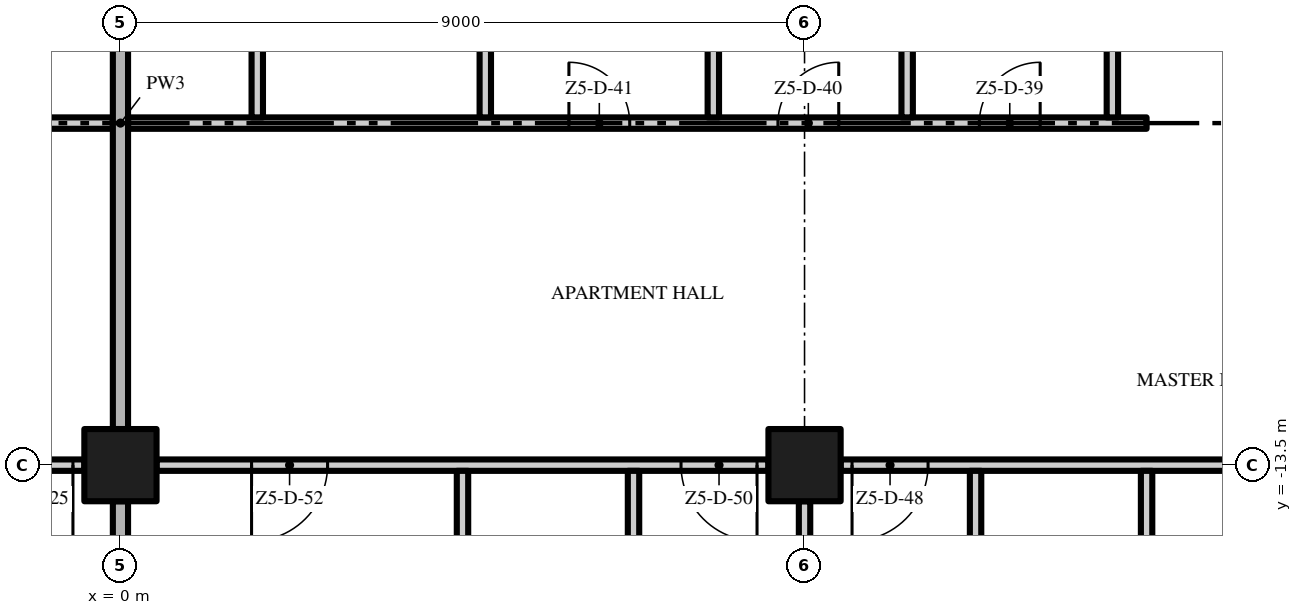
"""IFC4 building model, lengths in metres.
Left out: names, types, materials, properties, quantities, classifications, styles, units other than length and angle.
Written with IfcOpenShell. Run it as: python <this file> out.ifc"""

import sys

from ifc_helpers import new_model, si_unit, direction, frame, frame_2d, origin, origin_2d, place, context, subcontext, project, spatial, rectangle, extrude, element, fill, save


model = new_model("IFC4")
c1 = context("Model", 3, precision=1e-05, world=origin(), true_north=direction((0.0, 1.0)))
c2 = subcontext(c1, "Body", "Model", "MODEL_VIEW")
j1 = project(units=[si_unit("LENGTHUNIT", "METRE"), si_unit("PLANEANGLEUNIT", "RADIAN")], contexts=[c1])
p1 = place(None, origin())
s1 = spatial("IfcSite", under=j1, at=p1, CompositionType="ELEMENT")
p2 = place(p1, origin())
s2 = spatial("IfcBuilding", under=s1, at=p2, CompositionType="ELEMENT")
p3 = place(p2, frame((0.0, 0.0, 273.0)))
s3 = spatial("IfcBuildingStorey", under=s2, at=p3, CompositionType="ELEMENT", Elevation=273.0)
for number, where, z_axis, x_axis in (
    (1, (0.0, -13.5, 0.0), (0.0, 0.0, 1.0), (1.0, 0.0, 0.0)),
    (2, (9.0, -13.5, 0.0), (0.0, 0.0, 1.0), (1.0, 0.0, 0.0)),
):
    element("IfcColumn", number, at=place(p3, frame(where, z_axis=z_axis, x_axis=x_axis)), inside=s3, PredefinedType="COLUMN", context=c2, shape_type="SweptSolid", body=[
        extrude(rectangle(XDim=0.95, YDim=0.95, at=origin_2d()), origin(), (0.0, 0.0, 1.0), 3.5),
    ])
p4 = place(p3, frame((-0.475, -13.5, 0.0), z_axis=(0.0, 0.0, 1.0), x_axis=(-1.0, 0.0, 0.0)))
e3 = element("IfcWall", 3, at=p4, inside=s3, PredefinedType="PARTITIONING", context=c2, shape_type="SweptSolid", body=[
    extrude(rectangle(XDim=8.05, YDim=0.15, at=frame_2d((4.025, 0.0))), origin(), (0.0, 0.0, 1.0), 3.5),
])
p5 = place(p4, frame((0.15, 0.0, 0.0)))
e4 = element("IfcOpeningElement", 4, at=p5, cuts=e3, PredefinedType="OPENING", context=c2, shape_type="SweptSolid", body=[
    extrude(rectangle(XDim=1.0, YDim=2.4, at=frame_2d((0.5, 1.2))), frame((0.0, 0.085, 0.0), z_axis=(0.0, -1.0, 0.0), x_axis=(1.0, 0.0, 0.0)), (0.0, 0.0, 1.0), 0.17),
])
p6 = place(p4, frame((6.9, 0.0, 0.0)))
e5 = element("IfcOpeningElement", 5, at=p6, cuts=e3, PredefinedType="OPENING", context=c2, shape_type="SweptSolid", body=[
    extrude(rectangle(XDim=1.0, YDim=2.4, at=frame_2d((0.5, 1.2))), frame((0.0, 0.085, 0.0), z_axis=(0.0, -1.0, 0.0), x_axis=(1.0, 0.0, 0.0)), (0.0, 0.0, 1.0), 0.17),
])
p7 = place(p3, frame((8.525, -13.5, 0.0), z_axis=(0.0, 0.0, 1.0), x_axis=(-1.0, 0.0, 0.0)))
e6 = element("IfcWall", 6, at=p7, inside=s3, PredefinedType="PARTITIONING", context=c2, shape_type="SweptSolid", body=[
    extrude(rectangle(XDim=8.05, YDim=0.15, at=frame_2d((4.025, 0.0))), origin(), (0.0, 0.0, 1.0), 3.5),
])
p8 = place(p7, frame((0.15, 0.0, 0.0)))
e7 = element("IfcOpeningElement", 7, at=p8, cuts=e6, PredefinedType="OPENING", context=c2, shape_type="SweptSolid", body=[
    extrude(rectangle(XDim=1.0, YDim=2.4, at=frame_2d((0.5, 1.2))), frame((0.0, 0.085, 0.0), z_axis=(0.0, -1.0, 0.0), x_axis=(1.0, 0.0, 0.0)), (0.0, 0.0, 1.0), 0.17),
])
p9 = place(p7, frame((5.8, 0.0, 0.0)))
e8 = element("IfcOpeningElement", 8, at=p9, cuts=e6, PredefinedType="OPENING", context=c2, shape_type="SweptSolid", body=[
    extrude(rectangle(XDim=1.0, YDim=2.4, at=frame_2d((0.5, 1.2))), frame((0.0, 0.085, 0.0), z_axis=(0.0, -1.0, 0.0), x_axis=(1.0, 0.0, 0.0)), (0.0, 0.0, 1.0), 0.17),
])
p10 = place(p3, frame((17.525, -13.5, 0.0), z_axis=(0.0, 0.0, 1.0), x_axis=(-1.0, 0.0, 0.0)))
e9 = element("IfcWall", 9, at=p10, inside=s3, PredefinedType="PARTITIONING", context=c2, shape_type="SweptSolid", body=[
    extrude(rectangle(XDim=8.05, YDim=0.15, at=frame_2d((4.025, 0.0))), origin(), (0.0, 0.0, 1.0), 3.5),
])
p11 = place(p10, frame((0.15, 0.0, 0.0)))
e10 = element("IfcOpeningElement", 10, at=p11, cuts=e9, PredefinedType="OPENING", context=c2, shape_type="SweptSolid", body=[
    extrude(rectangle(XDim=1.0, YDim=2.4, at=frame_2d((0.5, 1.2))), frame((0.0, 0.085, 0.0), z_axis=(0.0, -1.0, 0.0), x_axis=(1.0, 0.0, 0.0)), (0.0, 0.0, 1.0), 0.17),
])
p12 = place(p10, frame((6.9, 0.0, 0.0)))
e11 = element("IfcOpeningElement", 11, at=p12, cuts=e9, PredefinedType="OPENING", context=c2, shape_type="SweptSolid", body=[
    extrude(rectangle(XDim=1.0, YDim=2.4, at=frame_2d((0.5, 1.2))), frame((0.0, 0.085, 0.0), z_axis=(0.0, -1.0, 0.0), x_axis=(1.0, 0.0, 0.0)), (0.0, 0.0, 1.0), 0.17),
])
p13 = place(p3, frame((-13.425, -9.0, 0.0), z_axis=(0.0, 0.0, 1.0), x_axis=(1.0, 0.0, 0.0)))
e12 = element("IfcWall", 12, at=p13, inside=s3, PredefinedType="PARTITIONING", context=c2, shape_type="SweptSolid", body=[
    extrude(rectangle(XDim=13.325, YDim=0.15, at=frame_2d((6.662, 0.0))), origin(), (0.0, 0.0, 1.0), 3.5),
])
p14 = place(p13, frame((4.675, 0.0, 0.0)))
e13 = element("IfcOpeningElement", 13, at=p14, cuts=e12, PredefinedType="OPENING", context=c2, shape_type="SweptSolid", body=[
    extrude(rectangle(XDim=1.0, YDim=2.4, at=frame_2d((0.5, 1.2))), frame((0.0, 0.085, 0.0), z_axis=(0.0, -1.0, 0.0), x_axis=(1.0, 0.0, 0.0)), (0.0, 0.0, 1.0), 0.17),
])
p15 = place(p3, frame((0.1, -9.0, 0.0), z_axis=(0.0, 0.0, 1.0), x_axis=(1.0, 0.0, 0.0)))
e14 = element("IfcWall", 14, at=p15, inside=s3, PredefinedType="PARTITIONING", context=c2, shape_type="SweptSolid", body=[
    extrude(rectangle(XDim=13.4, YDim=0.15, at=frame_2d((6.7, 0.0))), origin(), (0.0, 0.0, 1.0), 3.5),
])
p16 = place(p15, frame((11.2, 0.0, 0.0)))
e15 = element("IfcOpeningElement", 15, at=p16, cuts=e14, PredefinedType="OPENING", context=c2, shape_type="SweptSolid", body=[
    extrude(rectangle(XDim=0.8, YDim=2.0, at=frame_2d((0.4, 1.0))), frame((0.0, 0.085, 0.0), z_axis=(0.0, -1.0, 0.0), x_axis=(1.0, 0.0, 0.0)), (0.0, 0.0, 1.0), 0.17),
])
p17 = place(p15, frame((8.55, 0.0, 0.0)))
e16 = element("IfcOpeningElement", 16, at=p17, cuts=e14, PredefinedType="OPENING", context=c2, shape_type="SweptSolid", body=[
    extrude(rectangle(XDim=0.8, YDim=2.0, at=frame_2d((0.4, 1.0))), frame((0.0, 0.085, 0.0), z_axis=(0.0, -1.0, 0.0), x_axis=(1.0, 0.0, 0.0)), (0.0, 0.0, 1.0), 0.17),
])
p18 = place(p15, frame((5.8, 0.0, 0.0)))
e17 = element("IfcOpeningElement", 17, at=p18, cuts=e14, PredefinedType="OPENING", context=c2, shape_type="SweptSolid", body=[
    extrude(rectangle(XDim=0.8, YDim=2.0, at=frame_2d((0.4, 1.0))), frame((0.0, 0.085, 0.0), z_axis=(0.0, -1.0, 0.0), x_axis=(1.0, 0.0, 0.0)), (0.0, 0.0, 1.0), 0.17),
])
p19 = place(p3, frame((0.0, -21.6, 0.0), z_axis=(0.0, 0.0, 1.0), x_axis=(0.0, 1.0, 0.0)))
e18 = element("IfcWall", 18, at=p19, inside=s3, PredefinedType="PARTITIONING", context=c2, shape_type="SweptSolid", body=[
    extrude(rectangle(XDim=7.625, YDim=0.2, at=frame_2d((3.812, 0.0))), origin(), (0.0, 0.0, 1.0), 3.5),
])
p20 = place(p3, frame((0.0, -13.025, 0.0), z_axis=(0.0, 0.0, 1.0), x_axis=(0.0, 1.0, 0.0)))
e19 = element("IfcWall", 19, at=p20, inside=s3, PredefinedType="PARTITIONING", context=c2, shape_type="SweptSolid", body=[
    extrude(rectangle(XDim=8.05, YDim=0.2, at=frame_2d((4.025, 0.0))), origin(), (0.0, 0.0, 1.0), 3.5),
])
p21 = place(p3, frame((1.8, -8.925, 0.0), z_axis=(0.0, 0.0, 1.0), x_axis=(0.0, 1.0, 0.0)))
e20 = element("IfcWall", 20, at=p21, inside=s3, PredefinedType="PARTITIONING", context=c2, shape_type="SweptSolid", body=[
    extrude(rectangle(XDim=4.35, YDim=0.15, at=frame_2d((2.175, 0.0))), origin(), (0.0, 0.0, 1.0), 3.5),
])
p22 = place(p3, frame((4.5, -22.2, 0.0), z_axis=(0.0, 0.0, 1.0), x_axis=(0.0, 1.0, 0.0)))
e21 = element("IfcWall", 21, at=p22, inside=s3, PredefinedType="PARTITIONING", context=c2, shape_type="SweptSolid", body=[
    extrude(rectangle(XDim=8.625, YDim=0.15, at=frame_2d((4.312, 0.0))), origin(), (0.0, 0.0, 1.0), 3.5),
])
p23 = place(p3, frame((4.8, -8.925, 0.0), z_axis=(0.0, 0.0, 1.0), x_axis=(0.0, 1.0, 0.0)))
e22 = element("IfcWall", 22, at=p23, inside=s3, PredefinedType="PARTITIONING", context=c2, shape_type="SweptSolid", body=[
    extrude(rectangle(XDim=4.35, YDim=0.15, at=frame_2d((2.175, 0.0))), origin(), (0.0, 0.0, 1.0), 3.5),
])
p24 = place(p3, frame((6.75, -16.575, 0.0), z_axis=(0.0, 0.0, 1.0), x_axis=(0.0, 1.0, 0.0)))
e23 = element("IfcWall", 23, at=p24, inside=s3, PredefinedType="PARTITIONING", context=c2, shape_type="SweptSolid", body=[
    extrude(rectangle(XDim=3.0, YDim=0.15, at=frame_2d((1.5, 0.0))), origin(), (0.0, 0.0, 1.0), 3.5),
])
p25 = place(p3, frame((7.8, -8.925, 0.0), z_axis=(0.0, 0.0, 1.0), x_axis=(0.0, 1.0, 0.0)))
e24 = element("IfcWall", 24, at=p25, inside=s3, PredefinedType="PARTITIONING", context=c2, shape_type="SweptSolid", body=[
    extrude(rectangle(XDim=4.35, YDim=0.15, at=frame_2d((2.175, 0.0))), origin(), (0.0, 0.0, 1.0), 3.5),
])
p26 = place(p3, frame((9.0, -21.6, 0.0), z_axis=(0.0, 0.0, 1.0), x_axis=(0.0, 1.0, 0.0)))
e25 = element("IfcWall", 25, at=p26, inside=s3, PredefinedType="PARTITIONING", context=c2, shape_type="SweptSolid", body=[
    extrude(rectangle(XDim=7.625, YDim=0.15, at=frame_2d((3.812, 0.0))), origin(), (0.0, 0.0, 1.0), 3.5),
])
p27 = place(p3, frame((10.35, -8.925, 0.0), z_axis=(0.0, 0.0, 1.0), x_axis=(0.0, 1.0, 0.0)))
e26 = element("IfcWall", 26, at=p27, inside=s3, PredefinedType="PARTITIONING", context=c2, shape_type="SweptSolid", body=[
    extrude(rectangle(XDim=4.35, YDim=0.15, at=frame_2d((2.175, 0.0))), origin(), (0.0, 0.0, 1.0), 3.5),
])
p28 = place(p3, frame((11.25, -16.575, 0.0), z_axis=(0.0, 0.0, 1.0), x_axis=(0.0, 1.0, 0.0)))
e27 = element("IfcWall", 27, at=p28, inside=s3, PredefinedType="PARTITIONING", context=c2, shape_type="SweptSolid", body=[
    extrude(rectangle(XDim=3.0, YDim=0.15, at=frame_2d((1.5, 0.0))), origin(), (0.0, 0.0, 1.0), 3.5),
])
p29 = place(p3, frame((13.05, -8.925, 0.0), z_axis=(0.0, 0.0, 1.0), x_axis=(0.0, 1.0, 0.0)))
e28 = element("IfcWall", 28, at=p29, inside=s3, PredefinedType="PARTITIONING", context=c2, shape_type="SweptSolid", body=[
    extrude(rectangle(XDim=4.5, YDim=0.15, at=frame_2d((2.25, 0.0))), origin(), (0.0, 0.0, 1.0), 3.5),
])
p30 = place(p3, frame((13.5, -22.2, 0.0), z_axis=(0.0, 0.0, 1.0), x_axis=(0.0, 1.0, 0.0)))
e29 = element("IfcWall", 29, at=p30, inside=s3, PredefinedType="PARTITIONING", context=c2, shape_type="SweptSolid", body=[
    extrude(rectangle(XDim=8.625, YDim=0.15, at=frame_2d((4.312, 0.0))), origin(), (0.0, 0.0, 1.0), 3.5),
])
p31 = place(p5, origin())
e30 = element("IfcDoor", 30, at=p31, inside=s3, OperationType="SINGLE_SWING_LEFT", PredefinedType="DOOR", context=c2, shape_type="SweptSolid", body=[
    extrude(rectangle(XDim=1.0, YDim=2.4, at=frame_2d((0.5, 1.2))), frame((0.0, 0.025, 0.0), z_axis=(0.0, -1.0, 0.0), x_axis=(1.0, 0.0, 0.0)), (0.0, 0.0, 1.0), 0.05),
])
fill(e4, e30)
p32 = place(p16, origin())
e31 = element("IfcDoor", 31, at=p32, inside=s3, OperationType="SINGLE_SWING_RIGHT", PredefinedType="DOOR", context=c2, shape_type="SweptSolid", body=[
    extrude(rectangle(XDim=0.8, YDim=2.0, at=frame_2d((0.4, 1.0))), frame((0.0, 0.025, 0.0), z_axis=(0.0, -1.0, 0.0), x_axis=(1.0, 0.0, 0.0)), (0.0, 0.0, 1.0), 0.05),
])
fill(e15, e31)
p33 = place(p17, origin())
e32 = element("IfcDoor", 32, at=p33, inside=s3, OperationType="SINGLE_SWING_RIGHT", PredefinedType="DOOR", context=c2, shape_type="SweptSolid", body=[
    extrude(rectangle(XDim=0.8, YDim=2.0, at=frame_2d((0.4, 1.0))), frame((0.0, 0.025, 0.0), z_axis=(0.0, -1.0, 0.0), x_axis=(1.0, 0.0, 0.0)), (0.0, 0.0, 1.0), 0.05),
])
fill(e16, e32)
p34 = place(p18, origin())
e33 = element("IfcDoor", 33, at=p34, inside=s3, OperationType="SINGLE_SWING_LEFT", PredefinedType="DOOR", context=c2, shape_type="SweptSolid", body=[
    extrude(rectangle(XDim=0.8, YDim=2.0, at=frame_2d((0.4, 1.0))), frame((0.0, 0.025, 0.0), z_axis=(0.0, -1.0, 0.0), x_axis=(1.0, 0.0, 0.0)), (0.0, 0.0, 1.0), 0.05),
])
fill(e17, e33)
p35 = place(p12, origin())
e34 = element("IfcDoor", 34, at=p35, inside=s3, OperationType="SINGLE_SWING_RIGHT", PredefinedType="DOOR", context=c2, shape_type="SweptSolid", body=[
    extrude(rectangle(XDim=1.0, YDim=2.4, at=frame_2d((0.5, 1.2))), frame((0.0, 0.025, 0.0), z_axis=(0.0, -1.0, 0.0), x_axis=(1.0, 0.0, 0.0)), (0.0, 0.0, 1.0), 0.05),
])
fill(e11, e34)
p36 = place(p8, origin())
e35 = element("IfcDoor", 35, at=p36, inside=s3, OperationType="SINGLE_SWING_LEFT", PredefinedType="DOOR", context=c2, shape_type="SweptSolid", body=[
    extrude(rectangle(XDim=1.0, YDim=2.4, at=frame_2d((0.5, 1.2))), frame((0.0, 0.025, 0.0), z_axis=(0.0, -1.0, 0.0), x_axis=(1.0, 0.0, 0.0)), (0.0, 0.0, 1.0), 0.05),
])
fill(e7, e35)
p37 = place(p9, origin())
e36 = element("IfcDoor", 36, at=p37, inside=s3, OperationType="SINGLE_SWING_RIGHT", PredefinedType="DOOR", context=c2, shape_type="SweptSolid", body=[
    extrude(rectangle(XDim=1.0, YDim=2.4, at=frame_2d((0.5, 1.2))), frame((0.0, 0.025, 0.0), z_axis=(0.0, -1.0, 0.0), x_axis=(1.0, 0.0, 0.0)), (0.0, 0.0, 1.0), 0.05),
])
fill(e8, e36)
save(model, sys.argv[1])
